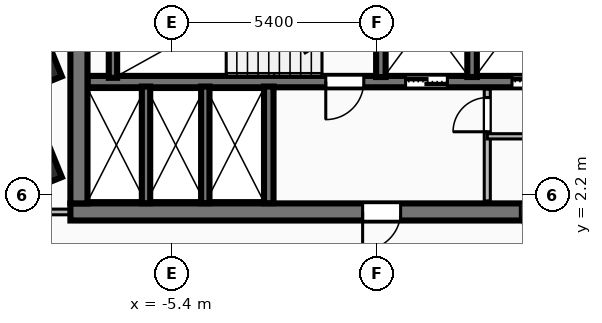
"""IFC4 building model, lengths in metres.
Left out: names, types, materials, properties, quantities, classifications, styles, units other than length and angle.
Written with IfcOpenShell. Run it as: python <this file> out.ifc"""

import sys

from ifc_helpers import new_model, si_unit, direction, frame, frame_2d, origin, origin_2d, place, context, subcontext, project, spatial, rectangle, extrude, element, fill, save


model = new_model("IFC4")
c1 = context("Model", 3, precision=1e-05, world=origin(), true_north=direction((0.0, 1.0)))
c2 = subcontext(c1, "Body", "Model", "MODEL_VIEW")
j1 = project(units=[si_unit("LENGTHUNIT", "METRE"), si_unit("PLANEANGLEUNIT", "RADIAN")], contexts=[c1])
p1 = place(None, origin())
s1 = spatial("IfcSite", under=j1, at=p1, CompositionType="ELEMENT")
p2 = place(p1, origin())
s2 = spatial("IfcBuilding", under=s1, at=p2, CompositionType="ELEMENT")
p3 = place(p2, frame((0.0, 0.0, 177.48)))
s3 = spatial("IfcBuildingStorey", under=s2, at=p3, CompositionType="ELEMENT", Elevation=177.48)
p4 = place(p3, frame((8.07, 1.75, 0.0), z_axis=(0.0, 0.0, 1.0), x_axis=(-1.0, 0.0, 0.0)))
e1 = element("IfcWall", 1, at=p4, inside=s3, PredefinedType="SHEAR", context=c2, shape_type="SweptSolid", body=[
    extrude(rectangle(XDim=16.14, YDim=0.45, at=frame_2d((8.07, 0.0))), origin(), (0.0, 0.0, 1.0), 3.34),
])
p5 = place(p4, frame((7.45, 0.0, 0.0)))
e2 = element("IfcOpeningElement", 2, at=p5, cuts=e1, PredefinedType="OPENING", context=c2, shape_type="SweptSolid", body=[
    extrude(rectangle(XDim=1.0, YDim=2.1, at=frame_2d((0.5, 1.05))), frame((0.0, 0.235, 0.0), z_axis=(0.0, -1.0, 0.0), x_axis=(1.0, 0.0, 0.0)), (0.0, 0.0, 1.0), 0.47),
])
p6 = place(p4, frame((3.4, 0.0, 0.0)))
e3 = element("IfcOpeningElement", 3, at=p6, cuts=e1, PredefinedType="OPENING", context=c2, shape_type="SweptSolid", body=[
    extrude(rectangle(XDim=0.9, YDim=2.06, at=frame_2d((0.45, 1.03))), frame((0.0, 0.235, 0.0), z_axis=(0.0, -1.0, 0.0), x_axis=(1.0, 0.0, 0.0)), (0.0, 0.0, 1.0), 0.47),
])
p7 = place(p4, frame((1.1, 0.0, 0.0)))
e4 = element("IfcOpeningElement", 4, at=p7, cuts=e1, PredefinedType="OPENING", context=c2, shape_type="SweptSolid", body=[
    extrude(rectangle(XDim=0.9, YDim=2.06, at=frame_2d((0.45, 1.03))), frame((0.0, 0.235, 0.0), z_axis=(0.0, -1.0, 0.0), x_axis=(1.0, 0.0, 0.0)), (0.0, 0.0, 1.0), 0.47),
])
p8 = place(p3, frame((-7.845, 1.975, 0.0), z_axis=(0.0, 0.0, 1.0), x_axis=(0.0, 1.0, 0.0)))
e5 = element("IfcWall", 5, at=p8, inside=s3, PredefinedType="SHEAR", context=c2, shape_type="SweptSolid", body=[
    extrude(rectangle(XDim=6.335, YDim=0.45, at=frame_2d((3.167, 0.0))), origin(), (0.0, 0.0, 1.0), 3.34),
])
p9 = place(p3, frame((7.62, 5.18, 0.0), z_axis=(0.0, 0.0, 1.0), x_axis=(-1.0, 0.0, 0.0)))
e6 = element("IfcWall", 6, at=p9, inside=s3, PredefinedType="SOLIDWALL", context=c2, shape_type="SweptSolid", body=[
    extrude(rectangle(XDim=15.24, YDim=0.3, at=frame_2d((7.62, 0.0))), origin(), (0.0, 0.0, 1.0), 3.34),
])
p10 = place(p9, frame((5.77, 0.0, 0.0)))
e7 = element("IfcOpeningElement", 7, at=p10, cuts=e6, PredefinedType="OPENING", context=c2, shape_type="SweptSolid", body=[
    extrude(rectangle(XDim=1.1, YDim=2.15, at=frame_2d((0.55, 1.075))), frame((0.0, 0.16, 0.0), z_axis=(0.0, -1.0, 0.0), x_axis=(1.0, 0.0, 0.0)), (0.0, 0.0, 1.0), 0.32),
])
p11 = place(p9, frame((2.97, 0.0, 0.0)))
e8 = element("IfcOpeningElement", 8, at=p11, cuts=e6, PredefinedType="OPENING", context=c2, shape_type="SweptSolid", body=[
    extrude(rectangle(XDim=1.1, YDim=2.15, at=frame_2d((0.55, 1.075))), frame((0.0, 0.16, 0.0), z_axis=(0.0, -1.0, 0.0), x_axis=(1.0, 0.0, 0.0)), (0.0, 0.0, 1.0), 0.32),
])
p12 = place(p9, frame((7.97, 0.0, 0.0)))
e9 = element("IfcOpeningElement", 9, at=p12, cuts=e6, PredefinedType="OPENING", context=c2, shape_type="SweptSolid", body=[
    extrude(rectangle(XDim=1.0, YDim=2.1, at=frame_2d((0.5, 1.05))), frame((0.0, 0.16, 0.0), z_axis=(0.0, -1.0, 0.0), x_axis=(1.0, 0.0, 0.0)), (0.0, 0.0, 1.0), 0.32),
])
p13 = place(p3, frame((-6.95, 5.28, 0.0), z_axis=(0.0, 0.0, 1.0), x_axis=(0.0, 1.0, 0.0)))
e10 = element("IfcWall", 10, at=p13, inside=s3, PredefinedType="SOLIDWALL", context=c2, shape_type="SweptSolid", body=[
    extrude(rectangle(XDim=3.06, YDim=0.22, at=frame_2d((1.53, 0.0))), origin(), (0.0, 0.0, 1.0), 3.34),
])
for number, where, z_axis, x_axis in (
    (11, (0.1, 5.3, 0.0), (0.0, 0.0, 1.0), (0.0, 1.0, 0.0)),
    (12, (2.5, 5.3, 0.0), (0.0, 0.0, 1.0), (0.0, 1.0, 0.0)),
):
    element("IfcWall", number, at=place(p3, frame(where, z_axis=z_axis, x_axis=x_axis)), inside=s3, PredefinedType="SOLIDWALL", context=c2, shape_type="SweptSolid", body=[
        extrude(rectangle(XDim=3.04, YDim=0.25, at=frame_2d((1.52, 0.0))), origin(), (0.0, 0.0, 1.0), 3.34),
    ])
p14 = place(p3, frame((-2.85, 1.98, 0.0), z_axis=(0.0, 0.0, 1.0), x_axis=(0.0, 1.0, 0.0)))
e13 = element("IfcWall", 13, at=p14, inside=s3, PredefinedType="SOLIDWALL", context=c2, shape_type="SweptSolid", body=[
    extrude(rectangle(XDim=3.07, YDim=0.25, at=frame_2d((1.535, 0.0))), origin(), (0.0, 0.0, 1.0), 3.34),
])
for number, where, z_axis, x_axis in (
    (14, (-6.08, 1.98, 0.0), (0.0, 0.0, 1.0), (0.0, 1.0, 0.0)),
    (15, (-4.52, 1.98, 0.0), (0.0, 0.0, 1.0), (0.0, 1.0, 0.0)),
):
    element("IfcWall", number, at=place(p3, frame(where, z_axis=z_axis, x_axis=x_axis)), inside=s3, PredefinedType="SOLIDWALL", context=c2, shape_type="SweptSolid", body=[
        extrude(rectangle(XDim=3.07, YDim=0.22, at=frame_2d((1.535, 0.0))), origin(), (0.0, 0.0, 1.0), 3.34),
    ])
for number, where, z_axis, x_axis in (
    (16, (-8.85, 2.9, 0.0), (0.0, 0.0, 1.0), (0.926, 0.378, 0.0)),
    (17, (-8.85, 5.55, 0.0), (0.0, 0.0, 1.0), (0.926, 0.378, 0.0)),
):
    element("IfcColumn", number, at=place(p3, frame(where, z_axis=z_axis, x_axis=x_axis)), inside=s3, PredefinedType="COLUMN", context=c2, shape_type="SweptSolid", body=[
        extrude(rectangle(XDim=0.85, YDim=0.85, at=origin_2d()), origin(), (0.0, 0.0, 1.0), 3.6),
    ])
p15 = place(p3, frame((2.9, 2.04, 0.0), z_axis=(0.0, 0.0, 1.0), x_axis=(0.0, 1.0, 0.0)))
e18 = element("IfcWall", 18, at=p15, inside=s3, PredefinedType="PARTITIONING", context=c2, shape_type="SweptSolid", body=[
    extrude(rectangle(XDim=2.94, YDim=0.16, at=frame_2d((1.47, 0.0))), origin(), (0.0, 0.0, 1.0), 2.57),
])
p16 = place(p15, frame((1.82, 0.0, 0.0)))
e19 = element("IfcOpeningElement", 19, at=p16, cuts=e18, PredefinedType="OPENING", context=c2, shape_type="SweptSolid", body=[
    extrude(rectangle(XDim=0.9, YDim=2.06, at=frame_2d((0.45, 1.03))), frame((0.0, 0.09, 0.0), z_axis=(0.0, -1.0, 0.0), x_axis=(1.0, 0.0, 0.0)), (0.0, 0.0, 1.0), 0.18),
])
p17 = place(p3, frame((2.9, 3.74, 0.0), z_axis=(0.0, 0.0, 1.0), x_axis=(1.0, 0.0, 0.0)))
e20 = element("IfcWall", 20, at=p17, inside=s3, PredefinedType="PARTITIONING", context=c2, shape_type="SweptSolid", body=[
    extrude(rectangle(XDim=4.65, YDim=0.138, at=frame_2d((2.325, 0.0))), origin(), (0.0, 0.0, 1.0), 3.34),
])
p18 = place(p3, frame((-7.85, 1.75, 0.0), z_axis=(0.0, 0.0, 1.0), x_axis=(-1.0, 0.0, 0.0)))
e21 = element("IfcWall", 21, at=p18, inside=s3, PredefinedType="PARTITIONING", context=c2, shape_type="SweptSolid", body=[
    extrude(rectangle(XDim=1.67, YDim=0.15, at=frame_2d((0.835, 0.0))), origin(), (0.0, 0.0, 1.0), 2.57),
])
p19 = place(p5, origin())
e22 = element("IfcDoor", 22, at=p19, inside=s3, OperationType="SINGLE_SWING_RIGHT", PredefinedType="DOOR", context=c2, shape_type="SweptSolid", body=[
    extrude(rectangle(XDim=1.0, YDim=2.1, at=frame_2d((0.5, 1.05))), frame((0.0, 0.025, 0.0), z_axis=(0.0, -1.0, 0.0), x_axis=(1.0, 0.0, 0.0)), (0.0, 0.0, 1.0), 0.05),
])
fill(e2, e22)
p20 = place(p10, origin())
e23 = element("IfcDoor", 23, at=p20, inside=s3, OperationType="DOUBLE_DOOR_SLIDING", PredefinedType="DOOR", context=c2, shape_type="SweptSolid", body=[
    extrude(rectangle(XDim=1.1, YDim=2.15, at=frame_2d((0.55, 1.075))), frame((0.0, 0.025, 0.0), z_axis=(0.0, -1.0, 0.0), x_axis=(1.0, 0.0, 0.0)), (0.0, 0.0, 1.0), 0.05),
])
fill(e7, e23)
p21 = place(p11, origin())
e24 = element("IfcDoor", 24, at=p21, inside=s3, OperationType="DOUBLE_DOOR_SLIDING", PredefinedType="DOOR", context=c2, shape_type="SweptSolid", body=[
    extrude(rectangle(XDim=1.1, YDim=2.15, at=frame_2d((0.55, 1.075))), frame((0.0, 0.025, 0.0), z_axis=(0.0, -1.0, 0.0), x_axis=(1.0, 0.0, 0.0)), (0.0, 0.0, 1.0), 0.05),
])
fill(e8, e24)
p22 = place(p12, origin())
e25 = element("IfcDoor", 25, at=p22, inside=s3, OperationType="SINGLE_SWING_RIGHT", PredefinedType="DOOR", context=c2, shape_type="SweptSolid", body=[
    extrude(rectangle(XDim=1.0, YDim=2.1, at=frame_2d((0.5, 1.05))), frame((0.0, 0.025, 0.0), z_axis=(0.0, -1.0, 0.0), x_axis=(1.0, 0.0, 0.0)), (0.0, 0.0, 1.0), 0.05),
])
fill(e9, e25)
p23 = place(p6, origin())
e26 = element("IfcDoor", 26, at=p23, inside=s3, OperationType="SINGLE_SWING_LEFT", PredefinedType="DOOR", context=c2, shape_type="SweptSolid", body=[
    extrude(rectangle(XDim=0.9, YDim=2.06, at=frame_2d((0.45, 1.03))), frame((0.0, 0.025, 0.0), z_axis=(0.0, -1.0, 0.0), x_axis=(1.0, 0.0, 0.0)), (0.0, 0.0, 1.0), 0.05),
])
fill(e3, e26)
p24 = place(p16, origin())
e27 = element("IfcDoor", 27, at=p24, inside=s3, OperationType="SINGLE_SWING_LEFT", PredefinedType="DOOR", context=c2, shape_type="SweptSolid", body=[
    extrude(rectangle(XDim=0.9, YDim=2.06, at=frame_2d((0.45, 1.03))), frame((0.0, 0.025, 0.0), z_axis=(0.0, -1.0, 0.0), x_axis=(1.0, 0.0, 0.0)), (0.0, 0.0, 1.0), 0.05),
])
fill(e19, e27)
save(model, sys.argv[1])
